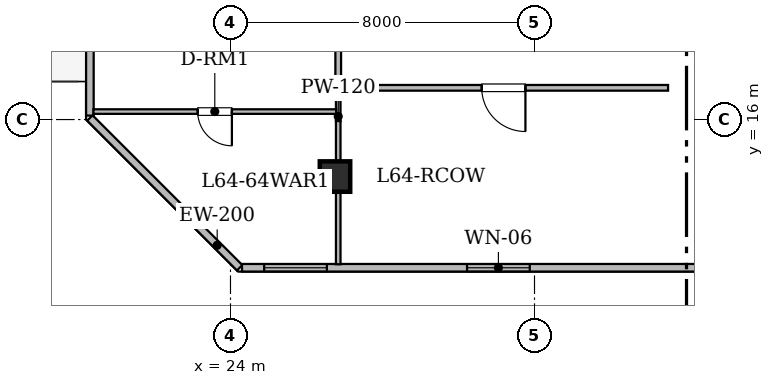
"""IFC4 building model, lengths in metres.
Left out: names, types, materials, properties, quantities, classifications, styles, units other than length and angle.
Written with IfcOpenShell. Run it as: python <this file> out.ifc"""

import sys

from ifc_helpers import new_model, si_unit, direction, frame, frame_2d, origin, origin_2d, place, context, subcontext, project, spatial, rectangle, hollow_rectangle, extrude, element, fill, save


model = new_model("IFC4")
c1 = context("Model", 3, precision=1e-05, world=origin(), true_north=direction((0.0, 1.0)))
c2 = subcontext(c1, "Body", "Model", "MODEL_VIEW")
j1 = project(units=[si_unit("LENGTHUNIT", "METRE"), si_unit("PLANEANGLEUNIT", "RADIAN")], contexts=[c1])
p1 = place(None, origin())
s1 = spatial("IfcSite", under=j1, at=p1, CompositionType="ELEMENT")
p2 = place(p1, origin())
s2 = spatial("IfcBuilding", under=s1, at=p2, CompositionType="ELEMENT")
p3 = place(p2, frame((0.0, 0.0, 250.05)))
s3 = spatial("IfcBuildingStorey", under=s2, at=p3, CompositionType="ELEMENT", Elevation=250.05)
p4 = place(p3, frame((26.75, 14.5, 0.0), z_axis=(0.0, 0.0, 1.0), x_axis=(1.0, 0.0, 0.0)))
e1 = element("IfcColumn", 1, at=p4, inside=s3, PredefinedType="COLUMN", context=c2, shape_type="SweptSolid", body=[
    extrude(hollow_rectangle(XDim=0.8, YDim=0.8, WallThickness=0.04, at=origin_2d()), origin(), (0.0, 0.0, 1.0), 3.65),
])
p5 = place(p3, frame((24.241, 12.1, 0.0), z_axis=(0.0, 0.0, 1.0), x_axis=(-0.707106781187, 0.707106781187, 0.0)))
e2 = element("IfcWall", 2, at=p5, inside=s3, PredefinedType="STANDARD", context=c2, shape_type="SweptSolid", body=[
    extrude(rectangle(XDim=5.573, YDim=0.2, at=frame_2d((2.787, 0.0))), origin(), (0.0, 0.0, 1.0), 3.43),
])
p6 = place(p3, frame((20.3, 16.104, 0.0), z_axis=(0.0, 0.0, 1.0), x_axis=(0.0, 1.0, 0.0)))
e3 = element("IfcWall", 3, at=p6, inside=s3, PredefinedType="STANDARD", context=c2, shape_type="SweptSolid", body=[
    extrude(rectangle(XDim=8.863, YDim=0.2, at=frame_2d((4.432, 0.0))), origin(), (0.0, 0.0, 1.0), 3.43),
])
p7 = place(p6, frame((6.856, 0.0, 0.0)))
e4 = element("IfcOpeningElement", 4, at=p7, cuts=e3, PredefinedType="OPENING", context=c2, shape_type="SweptSolid", body=[
    extrude(rectangle(XDim=1.1, YDim=2.2, at=frame_2d((0.55, 1.1))), frame((0.0, 0.11, 0.0), z_axis=(0.0, -1.0, 0.0), x_axis=(1.0, 0.0, 0.0)), (0.0, 0.0, 1.0), 0.22),
])
p8 = place(p3, frame((65.696, 12.1, 0.0), z_axis=(0.0, 0.0, 1.0), x_axis=(-1.0, 0.0, 0.0)))
e5 = element("IfcWall", 5, at=p8, inside=s3, PredefinedType="STANDARD", context=c2, shape_type="SweptSolid", body=[
    extrude(rectangle(XDim=41.393, YDim=0.2, at=frame_2d((20.697, 0.0))), origin(), (0.0, 0.0, 1.0), 3.43),
])
p9 = place(p8, frame((33.821, 0.0, 0.85)))
e6 = element("IfcOpeningElement", 6, at=p9, cuts=e5, PredefinedType="OPENING", context=c2, shape_type="SweptSolid", body=[
    extrude(rectangle(XDim=1.65, YDim=1.55, at=frame_2d((0.825, 0.775))), frame((0.0, 0.11, 0.0), z_axis=(0.0, -1.0, 0.0), x_axis=(1.0, 0.0, 0.0)), (0.0, 0.0, 1.0), 0.22),
])
p10 = place(p8, frame((39.16, 0.0, 0.85)))
e7 = element("IfcOpeningElement", 7, at=p10, cuts=e5, PredefinedType="OPENING", context=c2, shape_type="SweptSolid", body=[
    extrude(rectangle(XDim=1.65, YDim=1.55, at=frame_2d((0.825, 0.775))), frame((0.0, 0.11, 0.0), z_axis=(0.0, -1.0, 0.0), x_axis=(1.0, 0.0, 0.0)), (0.0, 0.0, 1.0), 0.22),
])
p11 = place(p8, frame((17.006, 0.0, 0.8)))
e8 = element("IfcOpeningElement", 8, at=p11, cuts=e5, PredefinedType="OPENING", context=c2, shape_type="SweptSolid", body=[
    extrude(rectangle(XDim=1.2, YDim=1.5, at=frame_2d((0.6, 0.75))), frame((0.0, 0.11, 0.0), z_axis=(0.0, -1.0, 0.0), x_axis=(1.0, 0.0, 0.0)), (0.0, 0.0, 1.0), 0.22),
])
p12 = place(p8, frame((20.411, 0.0, 0.85)))
e9 = element("IfcOpeningElement", 9, at=p12, cuts=e5, PredefinedType="OPENING", context=c2, shape_type="SweptSolid", body=[
    extrude(rectangle(XDim=1.65, YDim=1.55, at=frame_2d((0.825, 0.775))), frame((0.0, 0.11, 0.0), z_axis=(0.0, -1.0, 0.0), x_axis=(1.0, 0.0, 0.0)), (0.0, 0.0, 1.0), 0.22),
])
p13 = place(p8, frame((13.151, 0.0, 0.85)))
e10 = element("IfcOpeningElement", 10, at=p13, cuts=e5, PredefinedType="OPENING", context=c2, shape_type="SweptSolid", body=[
    extrude(rectangle(XDim=1.65, YDim=1.55, at=frame_2d((0.825, 0.775))), frame((0.0, 0.11, 0.0), z_axis=(0.0, -1.0, 0.0), x_axis=(1.0, 0.0, 0.0)), (0.0, 0.0, 1.0), 0.22),
])
p14 = place(p8, frame((2.936, 0.0, 0.8)))
e11 = element("IfcOpeningElement", 11, at=p14, cuts=e5, PredefinedType="OPENING", context=c2, shape_type="SweptSolid", body=[
    extrude(rectangle(XDim=1.2, YDim=1.5, at=frame_2d((0.6, 0.75))), frame((0.0, 0.11, 0.0), z_axis=(0.0, -1.0, 0.0), x_axis=(1.0, 0.0, 0.0)), (0.0, 0.0, 1.0), 0.22),
])
p15 = place(p8, frame((6.901, 0.0, 0.85)))
e12 = element("IfcOpeningElement", 12, at=p15, cuts=e5, PredefinedType="OPENING", context=c2, shape_type="SweptSolid", body=[
    extrude(rectangle(XDim=1.65, YDim=1.55, at=frame_2d((0.825, 0.775))), frame((0.0, 0.11, 0.0), z_axis=(0.0, -1.0, 0.0), x_axis=(1.0, 0.0, 0.0)), (0.0, 0.0, 1.0), 0.22),
])
p16 = place(p3, frame((35.514, 16.835, 0.0), z_axis=(0.0, 0.0, 1.0), x_axis=(-1.0, 0.0, 0.0)))
e13 = element("IfcWall", 13, at=p16, inside=s3, PredefinedType="STANDARD", context=c2, shape_type="SweptSolid", body=[
    extrude(rectangle(XDim=8.614, YDim=0.15, at=frame_2d((4.307, 0.0))), origin(), (0.0, 0.0, 1.0), 2.725),
])
p17 = place(p16, frame((3.753, 0.0, 0.0)))
e14 = element("IfcOpeningElement", 14, at=p17, cuts=e13, PredefinedType="OPENING", context=c2, shape_type="SweptSolid", body=[
    extrude(rectangle(XDim=1.15, YDim=2.2, at=frame_2d((0.575, 1.1))), frame((0.0, 0.085, 0.0), z_axis=(0.0, -1.0, 0.0), x_axis=(1.0, 0.0, 0.0)), (0.0, 0.0, 1.0), 0.17),
])
p18 = place(p3, frame((26.835, 16.9, 0.0), z_axis=(0.0, 0.0, 1.0), x_axis=(0.0, 1.0, 0.0)))
e15 = element("IfcWall", 15, at=p18, inside=s3, PredefinedType="STANDARD", context=c2, shape_type="SweptSolid", body=[
    extrude(rectangle(XDim=8.033, YDim=0.15, at=frame_2d((4.017, 0.0))), origin(), (0.0, 0.0, 1.0), 2.725),
])
p19 = place(p18, frame((3.495, 0.0, 0.0)))
e16 = element("IfcOpeningElement", 16, at=p19, cuts=e15, PredefinedType="OPENING", context=c2, shape_type="SweptSolid", body=[
    extrude(rectangle(XDim=1.0, YDim=2.15, at=frame_2d((0.5, 1.075))), frame((0.0, 0.085, 0.0), z_axis=(0.0, -1.0, 0.0), x_axis=(1.0, 0.0, 0.0)), (0.0, 0.0, 1.0), 0.17),
])
p20 = place(p3, frame((26.835, 15.961, 0.0), z_axis=(0.0, 0.0, 1.0), x_axis=(0.0, 1.0, 0.0)))
e17 = element("IfcWall", 17, at=p20, inside=s3, PredefinedType="PARTITIONING", context=c2, shape_type="SweptSolid", body=[
    extrude(rectangle(XDim=0.809, YDim=0.12, at=frame_2d((0.405, 0.0))), origin(), (0.0, 0.0, 1.0), 3.43),
])
p21 = place(p3, frame((26.835, 12.192, 0.0), z_axis=(0.0, 0.0, 1.0), x_axis=(0.0, 1.0, 0.0)))
e18 = element("IfcWall", 18, at=p21, inside=s3, PredefinedType="PARTITIONING", context=c2, shape_type="SweptSolid", body=[
    extrude(rectangle(XDim=3.769, YDim=0.12, at=frame_2d((1.885, 0.0))), origin(), (0.0, 0.0, 1.0), 2.725),
])
p22 = place(p3, frame((26.781, 16.21, 0.0), z_axis=(0.0, 0.0, 1.0), x_axis=(-1.0, 0.0, 0.0)))
e19 = element("IfcWall", 19, at=p22, inside=s3, PredefinedType="PARTITIONING", context=c2, shape_type="SweptSolid", body=[
    extrude(rectangle(XDim=6.389, YDim=0.12, at=frame_2d((3.194, 0.0))), origin(), (0.0, 0.0, 1.0), 2.887),
])
p23 = place(p22, frame((2.744, 0.0, 0.0)))
e20 = element("IfcOpeningElement", 20, at=p23, cuts=e19, PredefinedType="OPENING", context=c2, shape_type="SweptSolid", body=[
    extrude(rectangle(XDim=0.9, YDim=2.1, at=frame_2d((0.45, 1.05))), frame((0.0, 0.07, 0.0), z_axis=(0.0, -1.0, 0.0), x_axis=(1.0, 0.0, 0.0)), (0.0, 0.0, 1.0), 0.14),
])
p24 = place(p9, origin())
e21 = element("IfcWindow", 21, at=p24, inside=s3, PartitioningType="SINGLE_PANEL", PredefinedType="WINDOW", context=c2, shape_type="SweptSolid", body=[
    extrude(rectangle(XDim=1.65, YDim=1.55, at=frame_2d((0.825, 0.775))), frame((0.0, 0.03, 0.0), z_axis=(0.0, -1.0, 0.0), x_axis=(1.0, 0.0, 0.0)), (0.0, 0.0, 1.0), 0.06),
])
fill(e6, e21)
p25 = place(p10, origin())
e22 = element("IfcWindow", 22, at=p25, inside=s3, PartitioningType="SINGLE_PANEL", PredefinedType="WINDOW", context=c2, shape_type="SweptSolid", body=[
    extrude(rectangle(XDim=1.65, YDim=1.55, at=frame_2d((0.825, 0.775))), frame((0.0, 0.03, 0.0), z_axis=(0.0, -1.0, 0.0), x_axis=(1.0, 0.0, 0.0)), (0.0, 0.0, 1.0), 0.06),
])
fill(e7, e22)
p26 = place(p17, origin())
e23 = element("IfcDoor", 23, at=p26, inside=s3, OperationType="SINGLE_SWING_LEFT", PredefinedType="DOOR", context=c2, shape_type="SweptSolid", body=[
    extrude(rectangle(XDim=1.15, YDim=2.2, at=frame_2d((0.575, 1.1))), frame((0.0, 0.025, 0.0), z_axis=(0.0, -1.0, 0.0), x_axis=(1.0, 0.0, 0.0)), (0.0, 0.0, 1.0), 0.05),
])
fill(e14, e23)
p27 = place(p23, origin())
e24 = element("IfcDoor", 24, at=p27, inside=s3, OperationType="SINGLE_SWING_LEFT", PredefinedType="DOOR", context=c2, shape_type="SweptSolid", body=[
    extrude(rectangle(XDim=0.9, YDim=2.1, at=frame_2d((0.45, 1.05))), frame((0.0, 0.025, 0.0), z_axis=(0.0, -1.0, 0.0), x_axis=(1.0, 0.0, 0.0)), (0.0, 0.0, 1.0), 0.05),
])
fill(e20, e24)
save(model, sys.argv[1])
